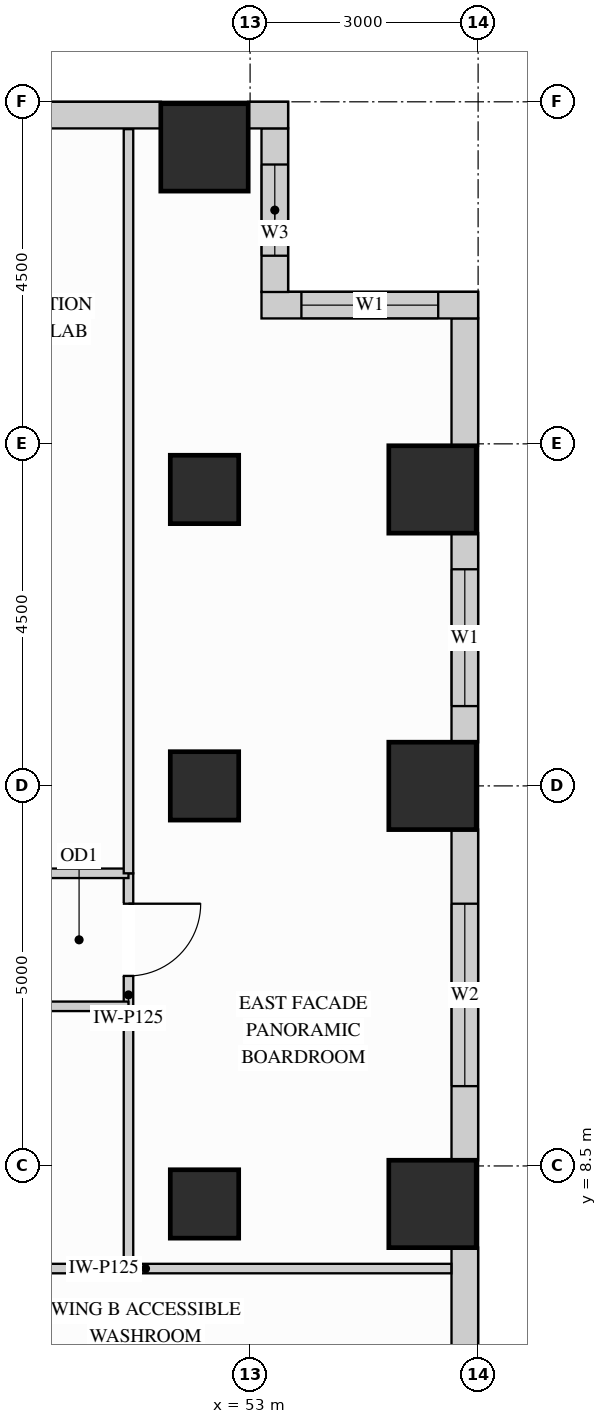
"""IFC4 building model, lengths in metres.
Left out: names, types, materials, properties, quantities, classifications, styles, units other than length and angle.
Written with IfcOpenShell. Run it as: python <this file> out.ifc"""

import sys

from ifc_helpers import new_model, si_unit, direction, frame, frame_2d, origin, origin_2d, place, context, subcontext, project, spatial, rectangle, extrude, source, transform, mapped, element, fill, save


model = new_model("IFC4")
c1 = context("Model", 3, precision=1e-05, world=origin(), true_north=direction((0.0, 1.0)))
c2 = subcontext(c1, "Body", "Model", "MODEL_VIEW")
j1 = project(units=[si_unit("LENGTHUNIT", "METRE"), si_unit("PLANEANGLEUNIT", "RADIAN")], contexts=[c1])
p1 = place(None, origin())
s1 = spatial("IfcSite", under=j1, at=p1, CompositionType="ELEMENT")
p2 = place(p1, origin())
s2 = spatial("IfcBuilding", under=s1, at=p2, CompositionType="ELEMENT")
p3 = place(p2, frame((0.0, 0.0, 120.6)))
s3 = spatial("IfcBuildingStorey", under=s2, at=p3, CompositionType="ELEMENT", Elevation=120.6)
m1 = source(origin(), c2, "Body", "SweptSolid", [
    extrude(rectangle(XDim=0.9, YDim=0.9, at=origin_2d()), origin(), (0.0, 0.0, 1.0), 3.38),
])
for number, where, z_axis, x_axis in (
    (1, (52.4, 13.5, 0.0), (0.0, 0.0, 1.0), (1.0, 0.0, 0.0)),
    (2, (52.4, 17.4, 0.0), (0.0, 0.0, 1.0), (1.0, 0.0, 0.0)),
    (3, (52.4, 8.0, 0.0), (0.0, 0.0, 1.0), (1.0, 0.0, 0.0)),
):
    element("IfcColumn", number, at=place(p3, frame(where, z_axis=z_axis, x_axis=x_axis)), inside=s3, PredefinedType="COLUMN", context=c2, shape_type="MappedRepresentation", body=[
        mapped(m1, transform((0.0, 0.0, 0.0), x_axis=(1.0, 0.0, 0.0), y_axis=(0.0, 1.0, 0.0), z_axis=(0.0, 0.0, 1.0))),
    ])
m2 = source(origin(), c2, "Body", "SweptSolid", [
    extrude(rectangle(XDim=1.15, YDim=1.15, at=origin_2d()), origin(), (0.0, 0.0, 1.0), 3.38),
])
for number, where, z_axis, x_axis in (
    (4, (52.4, 21.9, 0.0), (0.0, 0.0, 1.0), (1.0, 0.0, 0.0)),
    (5, (55.4, 13.5, 0.0), (0.0, 0.0, 1.0), (1.0, 0.0, 0.0)),
    (6, (55.4, 17.4, 0.0), (0.0, 0.0, 1.0), (1.0, 0.0, 0.0)),
    (7, (55.4, 8.0, 0.0), (0.0, 0.0, 1.0), (1.0, 0.0, 0.0)),
):
    element("IfcColumn", number, at=place(p3, frame(where, z_axis=z_axis, x_axis=x_axis)), inside=s3, PredefinedType="COLUMN", context=c2, shape_type="MappedRepresentation", body=[
        mapped(m2, transform((0.0, 0.0, 0.0), x_axis=(1.0, 0.0, 0.0), y_axis=(0.0, 1.0, 0.0), z_axis=(0.0, 0.0, 1.0))),
    ])
m3 = source(origin(), c2, "Body", "SweptSolid", [
    extrude(rectangle(XDim=3.354, YDim=0.35, at=frame_2d((1.677, 0.0))), origin(), (0.0, 0.0, 1.0), 3.365),
])
p4 = place(p3, frame((55.825, 4.073, 0.0), z_axis=(0.0, 0.0, 1.0), x_axis=(0.0, 1.0, 0.0)))
e8 = element("IfcWall", 8, at=p4, inside=s3, PredefinedType="SOLIDWALL", context=c2, shape_type="MappedRepresentation", body=[
    mapped(m3, transform((0.0, 0.0, 0.0), x_axis=(1.0, 0.0, 0.0), y_axis=(0.0, 1.0, 0.0), z_axis=(0.0, 0.0, 1.0))),
])
p5 = place(p3, frame((55.825, 8.573, 0.0), z_axis=(0.0, 0.0, 1.0), x_axis=(0.0, 1.0, 0.0)))
e9 = element("IfcWall", 9, at=p5, inside=s3, PredefinedType="SOLIDWALL", context=c2, shape_type="SweptSolid", body=[
    extrude(rectangle(XDim=4.354, YDim=0.35, at=frame_2d((2.177, 0.0))), origin(), (0.0, 0.0, 1.0), 3.365),
])
p6 = place(p5, frame((0.977, 0.0, 0.78)))
e10 = element("IfcOpeningElement", 10, at=p6, cuts=e9, PredefinedType="OPENING", context=c2, shape_type="SweptSolid", body=[
    extrude(rectangle(XDim=2.4, YDim=2.1, at=frame_2d((1.2, 1.05))), frame((0.0, 0.185, 0.0), z_axis=(0.0, -1.0, 0.0), x_axis=(1.0, 0.0, 0.0)), (0.0, 0.0, 1.0), 0.37),
])
p7 = place(p3, frame((55.825, 14.073, 0.0), z_axis=(0.0, 0.0, 1.0), x_axis=(0.0, 1.0, 0.0)))
e11 = element("IfcWall", 11, at=p7, inside=s3, PredefinedType="SOLIDWALL", context=c2, shape_type="SweptSolid", body=[
    extrude(rectangle(XDim=2.754, YDim=0.35, at=frame_2d((1.377, 0.0))), origin(), (0.0, 0.0, 1.0), 3.365),
])
p8 = place(p7, frame((0.477, 0.0, 0.78)))
e12 = element("IfcOpeningElement", 12, at=p8, cuts=e11, PredefinedType="OPENING", context=c2, shape_type="SweptSolid", body=[
    extrude(rectangle(XDim=1.8, YDim=2.1, at=frame_2d((0.9, 1.05))), frame((0.0, 0.185, 0.0), z_axis=(0.0, -1.0, 0.0), x_axis=(1.0, 0.0, 0.0)), (0.0, 0.0, 1.0), 0.37),
])
m4 = source(origin(), c2, "Body", "SweptSolid", [
    extrude(rectangle(XDim=1.679, YDim=0.35, at=frame_2d((0.84, 0.0))), origin(), (0.0, 0.0, 1.0), 3.365),
])
p9 = place(p3, frame((55.825, 17.973, 0.0), z_axis=(0.0, 0.0, 1.0), x_axis=(0.0, 1.0, 0.0)))
e13 = element("IfcWall", 13, at=p9, inside=s3, PredefinedType="SOLIDWALL", context=c2, shape_type="MappedRepresentation", body=[
    mapped(m4, transform((0.0, 0.0, 0.0), x_axis=(1.0, 0.0, 0.0), y_axis=(0.0, 1.0, 0.0), z_axis=(0.0, 0.0, 1.0))),
])
p10 = place(p3, frame((56.0, 19.825, 0.0), z_axis=(0.0, 0.0, 1.0), x_axis=(-1.0, 0.0, 0.0)))
e14 = element("IfcWall", 14, at=p10, inside=s3, PredefinedType="SOLIDWALL", context=c2, shape_type="SweptSolid", body=[
    extrude(rectangle(XDim=2.85, YDim=0.35, at=frame_2d((1.425, 0.0))), origin(), (0.0, 0.0, 1.0), 3.365),
])
p11 = place(p10, frame((0.525, 0.0, 0.78)))
e15 = element("IfcOpeningElement", 15, at=p11, cuts=e14, PredefinedType="OPENING", context=c2, shape_type="SweptSolid", body=[
    extrude(rectangle(XDim=1.8, YDim=2.1, at=frame_2d((0.9, 1.05))), frame((0.0, 0.185, 0.0), z_axis=(0.0, -1.0, 0.0), x_axis=(1.0, 0.0, 0.0)), (0.0, 0.0, 1.0), 0.37),
])
p12 = place(p3, frame((53.325, 19.998, 0.0), z_axis=(0.0, 0.0, 1.0), x_axis=(0.0, 1.0, 0.0)))
e16 = element("IfcWall", 16, at=p12, inside=s3, PredefinedType="SOLIDWALL", context=c2, shape_type="SweptSolid", body=[
    extrude(rectangle(XDim=2.154, YDim=0.35, at=frame_2d((1.077, 0.0))), origin(), (0.0, 0.0, 1.0), 3.365),
])
p13 = place(p12, frame((0.477, 0.0, 0.78)))
e17 = element("IfcOpeningElement", 17, at=p13, cuts=e16, PredefinedType="OPENING", context=c2, shape_type="SweptSolid", body=[
    extrude(rectangle(XDim=1.2, YDim=2.1, at=frame_2d((0.6, 1.05))), frame((0.0, 0.185, 0.0), z_axis=(0.0, -1.0, 0.0), x_axis=(1.0, 0.0, 0.0)), (0.0, 0.0, 1.0), 0.37),
])
m5 = source(origin(), c2, "Body", "SweptSolid", [
    extrude(rectangle(XDim=0.527, YDim=0.35, at=frame_2d((0.264, 0.0))), origin(), (0.0, 0.0, 1.0), 3.365),
])
p14 = place(p3, frame((53.5, 22.325, 0.0), z_axis=(0.0, 0.0, 1.0), x_axis=(-1.0, 0.0, 0.0)))
e18 = element("IfcWall", 18, at=p14, inside=s3, PredefinedType="SOLIDWALL", context=c2, shape_type="MappedRepresentation", body=[
    mapped(m5, transform((0.0, 0.0, 0.0), x_axis=(1.0, 0.0, 0.0), y_axis=(0.0, 1.0, 0.0), z_axis=(0.0, 0.0, 1.0))),
])
m6 = source(origin(), c2, "Body", "SweptSolid", [
    extrude(rectangle(XDim=1.854, YDim=0.35, at=frame_2d((0.927, 0.0))), origin(), (0.0, 0.0, 1.0), 3.365),
])
p15 = place(p3, frame((51.827, 22.325, 0.0), z_axis=(0.0, 0.0, 1.0), x_axis=(-1.0, 0.0, 0.0)))
e19 = element("IfcWall", 19, at=p15, inside=s3, PredefinedType="SOLIDWALL", context=c2, shape_type="MappedRepresentation", body=[
    mapped(m6, transform((0.0, 0.0, 0.0), x_axis=(1.0, 0.0, 0.0), y_axis=(0.0, 1.0, 0.0), z_axis=(0.0, 0.0, 1.0))),
])
p16 = place(p3, frame((51.4, 10.6, 0.0), z_axis=(0.0, 0.0, 1.0), x_axis=(0.0, 1.0, 0.0)))
e20 = element("IfcWall", 20, at=p16, inside=s3, PredefinedType="PARTITIONING", context=c2, shape_type="SweptSolid", body=[
    extrude(rectangle(XDim=1.75, YDim=0.125, at=frame_2d((0.875, 0.0))), origin(), (0.0, 0.0, 1.0), 3.365),
])
p17 = place(p16, frame((0.4, 0.0, 0.0)))
e21 = element("IfcOpeningElement", 21, at=p17, cuts=e20, PredefinedType="OPENING", context=c2, shape_type="SweptSolid", body=[
    extrude(rectangle(XDim=0.95, YDim=2.15, at=frame_2d((0.475, 1.075))), frame((0.0, 0.073, 0.0), z_axis=(0.0, -1.0, 0.0), x_axis=(1.0, 0.0, 0.0)), (0.0, 0.0, 1.0), 0.145),
])
m7 = source(origin(), c2, "Body", "SweptSolid", [
    extrude(rectangle(XDim=8.048, YDim=0.125, at=frame_2d((4.024, 0.0))), origin(), (0.0, 0.0, 1.0), 3.365),
])
p18 = place(p3, frame((47.6, 7.15, 0.0), z_axis=(0.0, 0.0, 1.0), x_axis=(1.0, 0.0, 0.0)))
e22 = element("IfcWall", 22, at=p18, inside=s3, PredefinedType="PARTITIONING", context=c2, shape_type="MappedRepresentation", body=[
    mapped(m7, transform((0.0, 0.0, 0.0), x_axis=(1.0, 0.0, 0.0), y_axis=(0.0, 1.0, 0.0), z_axis=(0.0, 0.0, 1.0))),
])
m8 = source(origin(), c2, "Body", "SweptSolid", [
    extrude(rectangle(XDim=3.8, YDim=0.125, at=frame_2d((1.9, 0.0))), origin(), (0.0, 0.0, 1.0), 3.365),
])
p19 = place(p3, frame((47.6, 12.35, 0.0), z_axis=(0.0, 0.0, 1.0), x_axis=(1.0, 0.0, 0.0)))
e23 = element("IfcWall", 23, at=p19, inside=s3, PredefinedType="PARTITIONING", context=c2, shape_type="MappedRepresentation", body=[
    mapped(m8, transform((0.0, 0.0, 0.0), x_axis=(1.0, 0.0, 0.0), y_axis=(0.0, 1.0, 0.0), z_axis=(0.0, 0.0, 1.0))),
])
p20 = place(p3, frame((47.6, 10.6, 0.0), z_axis=(0.0, 0.0, 1.0), x_axis=(1.0, 0.0, 0.0)))
e24 = element("IfcWall", 24, at=p20, inside=s3, PredefinedType="PARTITIONING", context=c2, shape_type="SweptSolid", body=[
    extrude(rectangle(XDim=3.8, YDim=0.125, at=frame_2d((1.9, 0.0))), origin(), (0.0, 0.0, 1.0), 2.677),
])
p21 = place(p20, frame((1.425, 0.0, 0.0)))
e25 = element("IfcOpeningElement", 25, at=p21, cuts=e24, PredefinedType="OPENING", context=c2, shape_type="SweptSolid", body=[
    extrude(rectangle(XDim=0.95, YDim=2.15, at=frame_2d((0.475, 1.075))), frame((0.0, 0.073, 0.0), z_axis=(0.0, -1.0, 0.0), x_axis=(1.0, 0.0, 0.0)), (0.0, 0.0, 1.0), 0.145),
])
m9 = source(origin(), c2, "Body", "SweptSolid", [
    extrude(rectangle(XDim=3.45, YDim=0.125, at=frame_2d((1.725, 0.0))), origin(), (0.0, 0.0, 1.0), 3.365),
])
p22 = place(p3, frame((51.4, 7.15, 0.0), z_axis=(0.0, 0.0, 1.0), x_axis=(0.0, 1.0, 0.0)))
e26 = element("IfcWall", 26, at=p22, inside=s3, PredefinedType="PARTITIONING", context=c2, shape_type="MappedRepresentation", body=[
    mapped(m9, transform((0.0, 0.0, 0.0), x_axis=(1.0, 0.0, 0.0), y_axis=(0.0, 1.0, 0.0), z_axis=(0.0, 0.0, 1.0))),
])
m10 = source(origin(), c2, "Body", "SweptSolid", [
    extrude(rectangle(XDim=9.79, YDim=0.125, at=frame_2d((4.895, 0.0))), origin(), (0.0, 0.0, 1.0), 3.365),
])
p23 = place(p3, frame((51.4, 12.35, 0.0), z_axis=(0.0, 0.0, 1.0), x_axis=(0.0, 1.0, 0.0)))
e27 = element("IfcWall", 27, at=p23, inside=s3, PredefinedType="PARTITIONING", context=c2, shape_type="MappedRepresentation", body=[
    mapped(m10, transform((0.0, 0.0, 0.0), x_axis=(1.0, 0.0, 0.0), y_axis=(0.0, 1.0, 0.0), z_axis=(0.0, 0.0, 1.0))),
])
m11 = source(origin(), c2, "Body", "SweptSolid", [
    extrude(rectangle(XDim=0.95, YDim=2.15, at=frame_2d((0.475, 1.075))), frame((0.0, 0.025, 0.0), z_axis=(0.0, -1.0, 0.0), x_axis=(1.0, 0.0, 0.0)), (0.0, 0.0, 1.0), 0.05),
])
p24 = place(p17, origin())
e28 = element("IfcDoor", 28, at=p24, inside=s3, OperationType="SINGLE_SWING_RIGHT", PredefinedType="DOOR", context=c2, shape_type="MappedRepresentation", body=[
    mapped(m11, transform((0.0, 0.0, 0.0), x_axis=(1.0, 0.0, 0.0), y_axis=(0.0, 1.0, 0.0), z_axis=(0.0, 0.0, 1.0))),
])
fill(e21, e28)
m12 = source(origin(), c2, "Body", "SweptSolid", [
    extrude(rectangle(XDim=1.8, YDim=2.1, at=frame_2d((0.9, 1.05))), frame((0.0, 0.03, 0.0), z_axis=(0.0, -1.0, 0.0), x_axis=(1.0, 0.0, 0.0)), (0.0, 0.0, 1.0), 0.06),
])
p25 = place(p8, origin())
e29 = element("IfcWindow", 29, at=p25, inside=s3, PartitioningType="SINGLE_PANEL", PredefinedType="WINDOW", context=c2, shape_type="MappedRepresentation", body=[
    mapped(m12, transform((0.0, 0.0, 0.0), x_axis=(1.0, 0.0, 0.0), y_axis=(0.0, 1.0, 0.0), z_axis=(0.0, 0.0, 1.0))),
])
fill(e12, e29)
p26 = place(p11, origin())
e30 = element("IfcWindow", 30, at=p26, inside=s3, PartitioningType="SINGLE_PANEL", PredefinedType="WINDOW", context=c2, shape_type="MappedRepresentation", body=[
    mapped(m12, transform((0.0, 0.0, 0.0), x_axis=(1.0, 0.0, 0.0), y_axis=(0.0, 1.0, 0.0), z_axis=(0.0, 0.0, 1.0))),
])
fill(e15, e30)
m13 = source(origin(), c2, "Body", "SweptSolid", [
    extrude(rectangle(XDim=2.4, YDim=2.1, at=frame_2d((1.2, 1.05))), frame((0.0, 0.03, 0.0), z_axis=(0.0, -1.0, 0.0), x_axis=(1.0, 0.0, 0.0)), (0.0, 0.0, 1.0), 0.06),
])
p27 = place(p6, origin())
e31 = element("IfcWindow", 31, at=p27, inside=s3, PartitioningType="SINGLE_PANEL", PredefinedType="WINDOW", context=c2, shape_type="MappedRepresentation", body=[
    mapped(m13, transform((0.0, 0.0, 0.0), x_axis=(1.0, 0.0, 0.0), y_axis=(0.0, 1.0, 0.0), z_axis=(0.0, 0.0, 1.0))),
])
fill(e10, e31)
m14 = source(origin(), c2, "Body", "SweptSolid", [
    extrude(rectangle(XDim=1.2, YDim=2.1, at=frame_2d((0.6, 1.05))), frame((0.0, 0.03, 0.0), z_axis=(0.0, -1.0, 0.0), x_axis=(1.0, 0.0, 0.0)), (0.0, 0.0, 1.0), 0.06),
])
p28 = place(p13, origin())
e32 = element("IfcWindow", 32, at=p28, inside=s3, PartitioningType="SINGLE_PANEL", PredefinedType="WINDOW", context=c2, shape_type="MappedRepresentation", body=[
    mapped(m14, transform((0.0, 0.0, 0.0), x_axis=(1.0, 0.0, 0.0), y_axis=(0.0, 1.0, 0.0), z_axis=(0.0, 0.0, 1.0))),
])
fill(e17, e32)
save(model, sys.argv[1])
